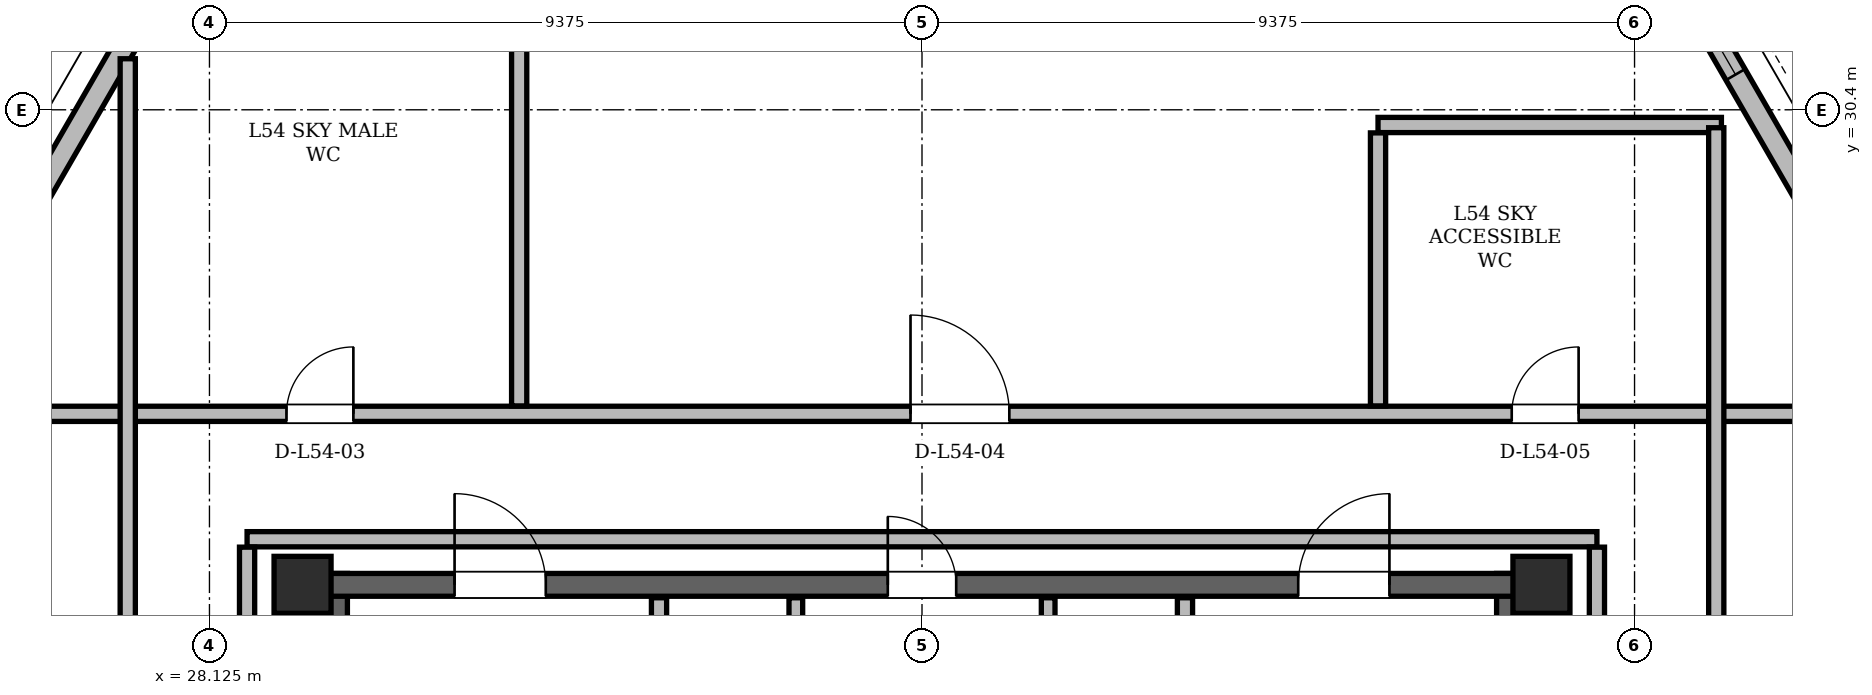
"""IFC4 building model, lengths in metres.
Left out: names, types, materials, properties, quantities, classifications, styles, units other than length and angle.
Written with IfcOpenShell. Run it as: python <this file> out.ifc"""

import sys

from ifc_helpers import new_model, si_unit, direction, frame, frame_2d, origin, origin_2d, place, context, subcontext, project, spatial, rectangle, hollow_rectangle, extrude, element, fill, save


model = new_model("IFC4")
c1 = context("Model", 3, precision=1e-05, world=origin(), true_north=direction((0.0, 1.0)))
c2 = subcontext(c1, "Body", "Model", "MODEL_VIEW")
j1 = project(units=[si_unit("LENGTHUNIT", "METRE"), si_unit("PLANEANGLEUNIT", "RADIAN")], contexts=[c1])
p1 = place(None, origin())
s1 = spatial("IfcSite", under=j1, at=p1, CompositionType="ELEMENT")
p2 = place(p1, origin())
s2 = spatial("IfcBuilding", under=s1, at=p2, CompositionType="ELEMENT")
p3 = place(p2, frame((0.0, 0.0, 204.6)))
s3 = spatial("IfcBuildingStorey", under=s2, at=p3, CompositionType="ELEMENT", Elevation=204.6)
for number, where, z_axis, x_axis in (
    (1, (45.65, 24.15, 0.0), (0.0, 0.0, 1.0), (1.0, 0.0, 0.0)),
    (2, (29.35, 24.15, 0.0), (0.0, 0.0, 1.0), (1.0, 0.0, 0.0)),
):
    element("IfcColumn", number, at=place(p3, frame(where, z_axis=z_axis, x_axis=x_axis)), inside=s3, PredefinedType="COLUMN", context=c2, shape_type="SweptSolid", body=[
        extrude(hollow_rectangle(XDim=0.75, YDim=0.75, WallThickness=0.06, at=origin_2d()), origin(), (0.0, 0.0, 1.0), 4.5),
    ])
for number, where, z_axis, x_axis in (
    (3, (29.74, 11.0, 0.0), (0.0, 0.0, 1.0), (0.0, 1.0, 0.0)),
    (4, (45.26, 11.0, 0.0), (0.0, 0.0, 1.0), (0.0, 1.0, 0.0)),
):
    element("IfcWall", number, at=place(p3, frame(where, z_axis=z_axis, x_axis=x_axis)), inside=s3, PredefinedType="SHEAR", context=c2, shape_type="SweptSolid", body=[
        extrude(rectangle(XDim=13.3, YDim=0.4, at=frame_2d((6.65, 0.0))), origin(), (0.0, 0.0, 1.0), 4.28),
    ])
p4 = place(p3, frame((29.65, 24.15, 0.0), z_axis=(0.0, 0.0, 1.0), x_axis=(1.0, 0.0, 0.0)))
e5 = element("IfcWall", 5, at=p4, inside=s3, PredefinedType="SHEAR", context=c2, shape_type="SweptSolid", body=[
    extrude(rectangle(XDim=15.7, YDim=0.3, at=frame_2d((7.85, 0.0))), origin(), (0.0, 0.0, 1.0), 4.28),
])
p5 = place(p4, frame((1.7, 0.0, 0.0)))
e6 = element("IfcOpeningElement", 6, at=p5, cuts=e5, PredefinedType="OPENING", context=c2, shape_type="SweptSolid", body=[
    extrude(rectangle(XDim=1.2, YDim=2.2, at=frame_2d((0.6, 1.1))), frame((0.0, 0.15, 0.0), z_axis=(0.0, -1.0, 0.0), x_axis=(1.0, 0.0, 0.0)), (0.0, 0.0, 1.0), 0.3),
])
p6 = place(p4, frame((12.8, 0.0, 0.0)))
e7 = element("IfcOpeningElement", 7, at=p6, cuts=e5, PredefinedType="OPENING", context=c2, shape_type="SweptSolid", body=[
    extrude(rectangle(XDim=1.2, YDim=2.2, at=frame_2d((0.6, 1.1))), frame((0.0, 0.15, 0.0), z_axis=(0.0, -1.0, 0.0), x_axis=(1.0, 0.0, 0.0)), (0.0, 0.0, 1.0), 0.3),
])
p7 = place(p4, frame((7.4, 0.0, 0.0)))
e8 = element("IfcOpeningElement", 8, at=p7, cuts=e5, PredefinedType="OPENING", context=c2, shape_type="SweptSolid", body=[
    extrude(rectangle(XDim=0.9, YDim=2.05, at=frame_2d((0.45, 1.025))), frame((0.0, 0.15, 0.0), z_axis=(0.0, -1.0, 0.0), x_axis=(1.0, 0.0, 0.0)), (0.0, 0.0, 1.0), 0.3),
])
p8 = place(p3, frame((49.213, 29.114, 0.0), z_axis=(0.0, 0.0, 1.0), x_axis=(-0.500006317603, 0.866021756284, 0.0)))
e9 = element("IfcWall", 9, at=p8, inside=s3, PredefinedType="SOLIDWALL", context=c2, shape_type="SweptSolid", body=[
    extrude(rectangle(XDim=16.255, YDim=0.29, at=frame_2d((8.127, 0.0))), origin(), (0.0, 0.0, 1.0), 3.577),
])
p9 = place(p8, frame((2.019, 0.0, 0.85)))
e10 = element("IfcOpeningElement", 10, at=p9, cuts=e9, PredefinedType="OPENING", context=c2, shape_type="SweptSolid", body=[
    extrude(rectangle(XDim=1.2, YDim=1.48, at=frame_2d((0.6, 0.74))), frame((0.0, 0.145, 0.0), z_axis=(0.0, -1.0, 0.0), x_axis=(1.0, 0.0, 0.0)), (0.0, 0.0, 1.0), 0.29),
])
p10 = place(p8, frame((11.835, 0.0, 0.85)))
e11 = element("IfcOpeningElement", 11, at=p10, cuts=e9, PredefinedType="OPENING", context=c2, shape_type="SweptSolid", body=[
    extrude(rectangle(XDim=2.8, YDim=2.05, at=frame_2d((1.4, 1.025))), frame((0.0, 0.145, 0.0), z_axis=(0.0, -1.0, 0.0), x_axis=(1.0, 0.0, 0.0)), (0.0, 0.0, 1.0), 0.29),
])
p11 = place(p3, frame((33.915, 43.191, 0.0), z_axis=(0.0, 0.0, 1.0), x_axis=(-0.499999813892, -0.866025511234, 0.0)))
e12 = element("IfcWall", 12, at=p11, inside=s3, PredefinedType="SOLIDWALL", context=c2, shape_type="SweptSolid", body=[
    extrude(rectangle(XDim=16.255, YDim=0.29, at=frame_2d((8.127, 0.0))), origin(), (0.0, 0.0, 1.0), 3.577),
])
p12 = place(p11, frame((2.094, 0.0, 0.85)))
e13 = element("IfcOpeningElement", 13, at=p12, cuts=e12, PredefinedType="OPENING", context=c2, shape_type="SweptSolid", body=[
    extrude(rectangle(XDim=2.5, YDim=2.15, at=frame_2d((1.25, 1.075))), frame((0.0, 0.145, 0.0), z_axis=(0.0, -1.0, 0.0), x_axis=(1.0, 0.0, 0.0)), (0.0, 0.0, 1.0), 0.29),
])
p13 = place(p11, frame((7.485, 0.0, 0.85)))
e14 = element("IfcOpeningElement", 14, at=p13, cuts=e12, PredefinedType="OPENING", context=c2, shape_type="SweptSolid", body=[
    extrude(rectangle(XDim=2.4, YDim=1.9, at=frame_2d((1.2, 0.95))), frame((0.0, 0.145, 0.0), z_axis=(0.0, -1.0, 0.0), x_axis=(1.0, 0.0, 0.0)), (0.0, 0.0, 1.0), 0.29),
])
p14 = place(p3, frame((34.04, 19.48, 0.0), z_axis=(0.0, 0.0, 1.0), x_axis=(0.0, 1.0, 0.0)))
e15 = element("IfcWall", 15, at=p14, inside=s3, PredefinedType="PARTITIONING", context=c2, shape_type="SweptSolid", body=[
    extrude(rectangle(XDim=4.5, YDim=0.2, at=frame_2d((2.25, 0.0))), origin(), (0.0, 0.0, 1.0), 4.28),
])
p15 = place(p14, frame((2.12, 0.0, 0.0)))
e16 = element("IfcOpeningElement", 16, at=p15, cuts=e15, PredefinedType="OPENING", context=c2, shape_type="SweptSolid", body=[
    extrude(rectangle(XDim=1.1, YDim=2.2, at=frame_2d((0.55, 1.1))), frame((0.0, 0.1, 0.0), z_axis=(0.0, -1.0, 0.0), x_axis=(1.0, 0.0, 0.0)), (0.0, 0.0, 1.0), 0.2),
])
p16 = place(p3, frame((35.84, 20.96, 0.0), z_axis=(0.0, 0.0, 1.0), x_axis=(0.0, 1.0, 0.0)))
e17 = element("IfcWall", 17, at=p16, inside=s3, PredefinedType="PARTITIONING", context=c2, shape_type="SweptSolid", body=[
    extrude(rectangle(XDim=3.02, YDim=0.18, at=frame_2d((1.51, 0.0))), origin(), (0.0, 0.0, 1.0), 4.28),
])
p17 = place(p3, frame((40.96, 19.48, 0.0), z_axis=(0.0, 0.0, 1.0), x_axis=(0.0, 1.0, 0.0)))
e18 = element("IfcWall", 18, at=p17, inside=s3, PredefinedType="PARTITIONING", context=c2, shape_type="SweptSolid", body=[
    extrude(rectangle(XDim=4.5, YDim=0.2, at=frame_2d((2.25, 0.0))), origin(), (0.0, 0.0, 1.0), 4.28),
])
p18 = place(p17, frame((2.12, 0.0, 0.0)))
e19 = element("IfcOpeningElement", 19, at=p18, cuts=e18, PredefinedType="OPENING", context=c2, shape_type="SweptSolid", body=[
    extrude(rectangle(XDim=1.1, YDim=2.2, at=frame_2d((0.55, 1.1))), frame((0.0, 0.1, 0.0), z_axis=(0.0, -1.0, 0.0), x_axis=(1.0, 0.0, 0.0)), (0.0, 0.0, 1.0), 0.2),
])
p19 = place(p3, frame((39.16, 20.96, 0.0), z_axis=(0.0, 0.0, 1.0), x_axis=(0.0, 1.0, 0.0)))
e20 = element("IfcWall", 20, at=p19, inside=s3, PredefinedType="PARTITIONING", context=c2, shape_type="SweptSolid", body=[
    extrude(rectangle(XDim=3.02, YDim=0.18, at=frame_2d((1.51, 0.0))), origin(), (0.0, 0.0, 1.0), 4.28),
])
p20 = place(p3, frame((28.62, 24.75, 0.0), z_axis=(0.0, 0.0, 1.0), x_axis=(1.0, 0.0, 0.0)))
e21 = element("IfcWall", 21, at=p20, inside=s3, PredefinedType="PARTITIONING", context=c2, shape_type="SweptSolid", body=[
    extrude(rectangle(XDim=17.76, YDim=0.2, at=frame_2d((8.88, 0.0))), origin(), (0.0, 0.0, 1.0), 3.813),
])
p21 = place(p3, frame((24.284, 26.4, 0.0), z_axis=(0.0, 0.0, 1.0), x_axis=(1.0, 0.0, 0.0)))
e22 = element("IfcWall", 22, at=p21, inside=s3, PredefinedType="PARTITIONING", context=c2, shape_type="SweptSolid", body=[
    extrude(rectangle(XDim=26.433, YDim=0.2, at=frame_2d((13.216, 0.0))), origin(), (0.0, 0.0, 1.0), 3.577),
])
p22 = place(p21, frame((4.855, 0.0, 0.0)))
e23 = element("IfcOpeningElement", 23, at=p22, cuts=e22, PredefinedType="OPENING", context=c2, shape_type="SweptSolid", body=[
    extrude(rectangle(XDim=0.88, YDim=2.08, at=frame_2d((0.44, 1.04))), frame((0.0, 0.1, 0.0), z_axis=(0.0, -1.0, 0.0), x_axis=(1.0, 0.0, 0.0)), (0.0, 0.0, 1.0), 0.2),
])
p23 = place(p21, frame((13.065, 0.0, 0.0)))
e24 = element("IfcOpeningElement", 24, at=p23, cuts=e22, PredefinedType="OPENING", context=c2, shape_type="SweptSolid", body=[
    extrude(rectangle(XDim=1.3, YDim=2.2, at=frame_2d((0.65, 1.1))), frame((0.0, 0.1, 0.0), z_axis=(0.0, -1.0, 0.0), x_axis=(1.0, 0.0, 0.0)), (0.0, 0.0, 1.0), 0.2),
])
p24 = place(p21, frame((20.975, 0.0, 0.0)))
e25 = element("IfcOpeningElement", 25, at=p24, cuts=e22, PredefinedType="OPENING", context=c2, shape_type="SweptSolid", body=[
    extrude(rectangle(XDim=0.88, YDim=2.08, at=frame_2d((0.44, 1.04))), frame((0.0, 0.1, 0.0), z_axis=(0.0, -1.0, 0.0), x_axis=(1.0, 0.0, 0.0)), (0.0, 0.0, 1.0), 0.2),
])
p25 = place(p3, frame((43.5, 30.2, 0.0), z_axis=(0.0, 0.0, 1.0), x_axis=(1.0, 0.0, 0.0)))
e26 = element("IfcWall", 26, at=p25, inside=s3, PredefinedType="PARTITIONING", context=c2, shape_type="SweptSolid", body=[
    extrude(rectangle(XDim=4.518, YDim=0.2, at=frame_2d((2.259, 0.0))), origin(), (0.0, 0.0, 1.0), 3.813),
])
p26 = place(p3, frame((27.05, 8.854, 0.0), z_axis=(0.0, 0.0, 1.0), x_axis=(0.0, 1.0, 0.0)))
e27 = element("IfcWall", 27, at=p26, inside=s3, PredefinedType="PARTITIONING", context=c2, shape_type="SweptSolid", body=[
    extrude(rectangle(XDim=22.218, YDim=0.2, at=frame_2d((11.109, 0.0))), origin(), (0.0, 0.0, 1.0), 3.577),
])
p27 = place(p26, frame((3.322, 0.0, 0.0)))
e28 = element("IfcOpeningElement", 28, at=p27, cuts=e27, PredefinedType="OPENING", context=c2, shape_type="SweptSolid", body=[
    extrude(rectangle(XDim=1.3, YDim=2.2, at=frame_2d((0.65, 1.1))), frame((0.0, 0.1, 0.0), z_axis=(0.0, -1.0, 0.0), x_axis=(1.0, 0.0, 0.0)), (0.0, 0.0, 1.0), 0.2),
])
p28 = place(p26, frame((10.445, 0.0, 0.0)))
e29 = element("IfcOpeningElement", 29, at=p28, cuts=e27, PredefinedType="OPENING", context=c2, shape_type="SweptSolid", body=[
    extrude(rectangle(XDim=1.3, YDim=2.2, at=frame_2d((0.65, 1.1))), frame((0.0, 0.1, 0.0), z_axis=(0.0, -1.0, 0.0), x_axis=(1.0, 0.0, 0.0)), (0.0, 0.0, 1.0), 0.2),
])
p29 = place(p3, frame((28.62, 10.504, 0.0), z_axis=(0.0, 0.0, 1.0), x_axis=(0.0, 1.0, 0.0)))
e30 = element("IfcWall", 30, at=p29, inside=s3, PredefinedType="PARTITIONING", context=c2, shape_type="SweptSolid", body=[
    extrude(rectangle(XDim=14.142, YDim=0.2, at=frame_2d((7.071, 0.0))), origin(), (0.0, 0.0, 1.0), 3.813),
])
p30 = place(p3, frame((32.2, 26.504, 0.0), z_axis=(0.0, 0.0, 1.0), x_axis=(0.0, 1.0, 0.0)))
e31 = element("IfcWall", 31, at=p30, inside=s3, PredefinedType="PARTITIONING", context=c2, shape_type="SweptSolid", body=[
    extrude(rectangle(XDim=6.892, YDim=0.2, at=frame_2d((3.446, 0.0))), origin(), (0.0, 0.0, 1.0), 4.28),
])
p31 = place(p3, frame((43.5, 26.504, 0.0), z_axis=(0.0, 0.0, 1.0), x_axis=(0.0, 1.0, 0.0)))
e32 = element("IfcWall", 32, at=p31, inside=s3, PredefinedType="PARTITIONING", context=c2, shape_type="SweptSolid", body=[
    extrude(rectangle(XDim=3.592, YDim=0.2, at=frame_2d((1.796, 0.0))), origin(), (0.0, 0.0, 1.0), 4.28),
])
p32 = place(p3, frame((46.38, 10.504, 0.0), z_axis=(0.0, 0.0, 1.0), x_axis=(0.0, 1.0, 0.0)))
e33 = element("IfcWall", 33, at=p32, inside=s3, PredefinedType="PARTITIONING", context=c2, shape_type="SweptSolid", body=[
    extrude(rectangle(XDim=14.142, YDim=0.2, at=frame_2d((7.071, 0.0))), origin(), (0.0, 0.0, 1.0), 3.813),
])
p33 = place(p3, frame((47.95, 8.854, 0.0), z_axis=(0.0, 0.0, 1.0), x_axis=(0.0, 1.0, 0.0)))
e34 = element("IfcWall", 34, at=p33, inside=s3, PredefinedType="PARTITIONING", context=c2, shape_type="SweptSolid", body=[
    extrude(rectangle(XDim=21.31, YDim=0.2, at=frame_2d((10.655, 0.0))), origin(), (0.0, 0.0, 1.0), 3.813),
])
p34 = place(p33, frame((3.898, 0.0, 0.0)))
e35 = element("IfcOpeningElement", 35, at=p34, cuts=e34, PredefinedType="OPENING", context=c2, shape_type="SweptSolid", body=[
    extrude(rectangle(XDim=1.3, YDim=2.2, at=frame_2d((0.65, 1.1))), frame((0.0, 0.1, 0.0), z_axis=(0.0, -1.0, 0.0), x_axis=(1.0, 0.0, 0.0)), (0.0, 0.0, 1.0), 0.2),
])
p35 = place(p33, frame((11.02, 0.0, 0.0)))
e36 = element("IfcOpeningElement", 36, at=p35, cuts=e34, PredefinedType="OPENING", context=c2, shape_type="SweptSolid", body=[
    extrude(rectangle(XDim=1.3, YDim=2.2, at=frame_2d((0.65, 1.1))), frame((0.0, 0.1, 0.0), z_axis=(0.0, -1.0, 0.0), x_axis=(1.0, 0.0, 0.0)), (0.0, 0.0, 1.0), 0.2),
])
p36 = place(p9, origin())
e37 = element("IfcWindow", 37, at=p36, inside=s3, PartitioningType="SINGLE_PANEL", PredefinedType="WINDOW", context=c2, shape_type="SweptSolid", body=[
    extrude(rectangle(XDim=1.2, YDim=1.48, at=frame_2d((0.6, 0.74))), frame((0.0, 0.03, 0.0), z_axis=(0.0, -1.0, 0.0), x_axis=(1.0, 0.0, 0.0)), (0.0, 0.0, 1.0), 0.06),
])
fill(e10, e37)
p37 = place(p5, origin())
e38 = element("IfcDoor", 38, at=p37, inside=s3, OperationType="SINGLE_SWING_LEFT", PredefinedType="DOOR", context=c2, shape_type="SweptSolid", body=[
    extrude(rectangle(XDim=1.2, YDim=2.2, at=frame_2d((0.6, 1.1))), frame((0.0, 0.025, 0.0), z_axis=(0.0, -1.0, 0.0), x_axis=(1.0, 0.0, 0.0)), (0.0, 0.0, 1.0), 0.05),
])
fill(e6, e38)
p38 = place(p6, origin())
e39 = element("IfcDoor", 39, at=p38, inside=s3, OperationType="SINGLE_SWING_RIGHT", PredefinedType="DOOR", context=c2, shape_type="SweptSolid", body=[
    extrude(rectangle(XDim=1.2, YDim=2.2, at=frame_2d((0.6, 1.1))), frame((0.0, 0.025, 0.0), z_axis=(0.0, -1.0, 0.0), x_axis=(1.0, 0.0, 0.0)), (0.0, 0.0, 1.0), 0.05),
])
fill(e7, e39)
p39 = place(p7, origin())
e40 = element("IfcDoor", 40, at=p39, inside=s3, OperationType="SINGLE_SWING_LEFT", PredefinedType="DOOR", context=c2, shape_type="SweptSolid", body=[
    extrude(rectangle(XDim=0.9, YDim=2.05, at=frame_2d((0.45, 1.025))), frame((0.0, 0.025, 0.0), z_axis=(0.0, -1.0, 0.0), x_axis=(1.0, 0.0, 0.0)), (0.0, 0.0, 1.0), 0.05),
])
fill(e8, e40)
p40 = place(p22, origin())
e41 = element("IfcDoor", 41, at=p40, inside=s3, OperationType="SINGLE_SWING_RIGHT", PredefinedType="DOOR", context=c2, shape_type="SweptSolid", body=[
    extrude(rectangle(XDim=0.88, YDim=2.08, at=frame_2d((0.44, 1.04))), frame((0.0, 0.025, 0.0), z_axis=(0.0, -1.0, 0.0), x_axis=(1.0, 0.0, 0.0)), (0.0, 0.0, 1.0), 0.05),
])
fill(e23, e41)
p41 = place(p23, origin())
e42 = element("IfcDoor", 42, at=p41, inside=s3, OperationType="SINGLE_SWING_LEFT", PredefinedType="DOOR", context=c2, shape_type="SweptSolid", body=[
    extrude(rectangle(XDim=1.3, YDim=2.2, at=frame_2d((0.65, 1.1))), frame((0.0, 0.025, 0.0), z_axis=(0.0, -1.0, 0.0), x_axis=(1.0, 0.0, 0.0)), (0.0, 0.0, 1.0), 0.05),
])
fill(e24, e42)
p42 = place(p24, origin())
e43 = element("IfcDoor", 43, at=p42, inside=s3, OperationType="SINGLE_SWING_RIGHT", PredefinedType="DOOR", context=c2, shape_type="SweptSolid", body=[
    extrude(rectangle(XDim=0.88, YDim=2.08, at=frame_2d((0.44, 1.04))), frame((0.0, 0.025, 0.0), z_axis=(0.0, -1.0, 0.0), x_axis=(1.0, 0.0, 0.0)), (0.0, 0.0, 1.0), 0.05),
])
fill(e25, e43)
save(model, sys.argv[1])
